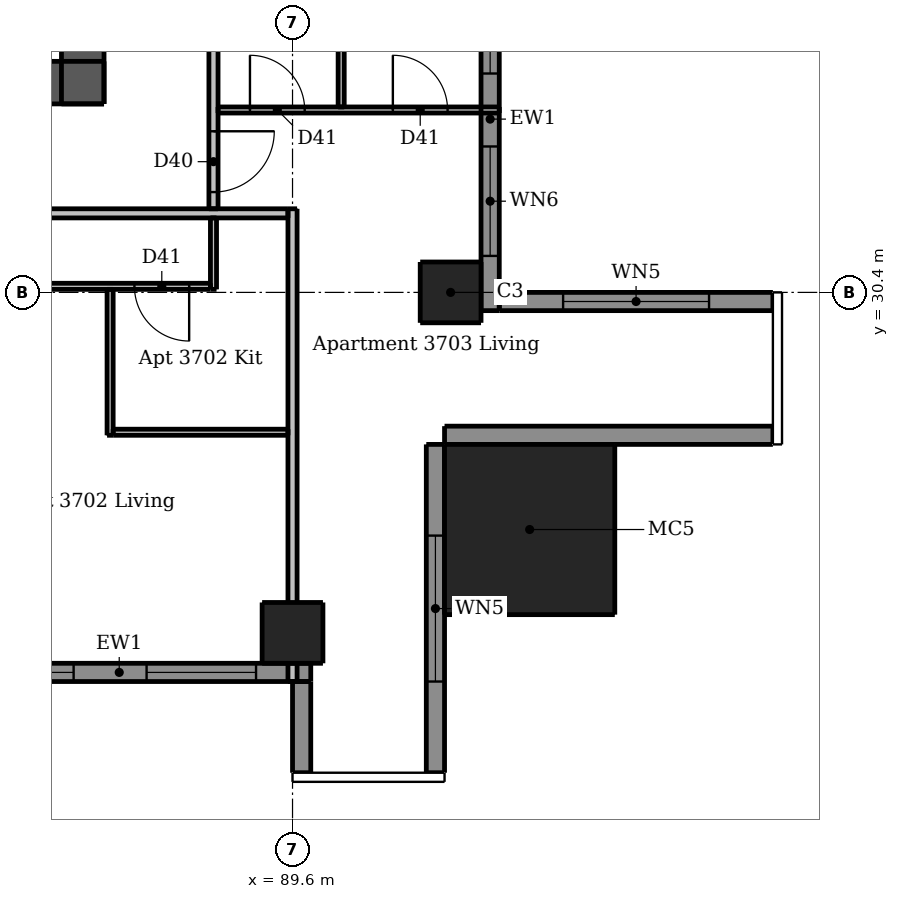
"""IFC4 building model, lengths in metres.
Left out: names, types, materials, properties, quantities, classifications, styles, units other than length and angle.
Written with IfcOpenShell. Run it as: python <this file> out.ifc"""

import sys

from ifc_helpers import new_model, si_unit, direction, frame, frame_2d, origin, origin_2d, place, context, subcontext, project, spatial, rectangle, extrude, element, fill, save


model = new_model("IFC4")
c1 = context("Model", 3, precision=1e-05, world=origin(), true_north=direction((0.0, 1.0)))
c2 = subcontext(c1, "Body", "Model", "MODEL_VIEW")
j1 = project(units=[si_unit("LENGTHUNIT", "METRE"), si_unit("PLANEANGLEUNIT", "RADIAN")], contexts=[c1])
p1 = place(None, origin())
s1 = spatial("IfcSite", under=j1, at=p1, CompositionType="ELEMENT")
p2 = place(p1, origin())
s2 = spatial("IfcBuilding", under=s1, at=p2, CompositionType="ELEMENT")
p3 = place(p2, frame((0.0, 0.0, 140.5)))
s3 = spatial("IfcBuildingStorey", under=s2, at=p3, CompositionType="ELEMENT", Elevation=140.5)
p4 = place(p3, frame((62.5, 33.85, 0.0), z_axis=(0.0, 0.0, 1.0), x_axis=(1.0, 0.0, 0.0)))
e1 = element("IfcWall", 1, at=p4, inside=s3, PredefinedType="SHEAR", context=c2, shape_type="SweptSolid", body=[
    extrude(rectangle(XDim=24.0, YDim=0.7, at=frame_2d((12.0, 0.0))), origin(), (0.0, 0.0, 1.0), 3.05),
])
p5 = place(p4, frame((1.962, 0.0, 0.0)))
e2 = element("IfcOpeningElement", 2, at=p5, cuts=e1, PredefinedType="OPENING", context=c2, shape_type="SweptSolid", body=[
    extrude(rectangle(XDim=1.1, YDim=2.1, at=frame_2d((0.55, 1.05))), frame((0.0, 0.36, 0.0), z_axis=(0.0, -1.0, 0.0), x_axis=(1.0, 0.0, 0.0)), (0.0, 0.0, 1.0), 0.72),
])
p6 = place(p4, frame((20.938, 0.0, 0.0)))
e3 = element("IfcOpeningElement", 3, at=p6, cuts=e1, PredefinedType="OPENING", context=c2, shape_type="SweptSolid", body=[
    extrude(rectangle(XDim=1.1, YDim=2.1, at=frame_2d((0.55, 1.05))), frame((0.0, 0.36, 0.0), z_axis=(0.0, -1.0, 0.0), x_axis=(1.0, 0.0, 0.0)), (0.0, 0.0, 1.0), 0.72),
])
p7 = place(p4, frame((8.0, 0.0, 0.0)))
e4 = element("IfcOpeningElement", 4, at=p7, cuts=e1, PredefinedType="OPENING", context=c2, shape_type="SweptSolid", body=[
    extrude(rectangle(XDim=1.1, YDim=2.1, at=frame_2d((0.55, 1.05))), frame((0.0, 0.36, 0.0), z_axis=(0.0, -1.0, 0.0), x_axis=(1.0, 0.0, 0.0)), (0.0, 0.0, 1.0), 0.72),
])
p8 = place(p4, frame((15.3, 0.0, 0.0)))
e5 = element("IfcOpeningElement", 5, at=p8, cuts=e1, PredefinedType="OPENING", context=c2, shape_type="SweptSolid", body=[
    extrude(rectangle(XDim=0.9, YDim=2.1, at=frame_2d((0.45, 1.05))), frame((0.0, 0.36, 0.0), z_axis=(0.0, -1.0, 0.0), x_axis=(1.0, 0.0, 0.0)), (0.0, 0.0, 1.0), 0.72),
])
p9 = place(p3, frame((86.15, 33.5, 0.0), z_axis=(0.0, 0.0, 1.0), x_axis=(0.0, 1.0, 0.0)))
e6 = element("IfcWall", 6, at=p9, inside=s3, PredefinedType="SHEAR", context=c2, shape_type="SweptSolid", body=[
    extrude(rectangle(XDim=24.0, YDim=0.7, at=frame_2d((12.0, 0.0))), origin(), (0.0, 0.0, 1.0), 3.05),
])
p10 = place(p9, frame((11.2, 0.0, 0.0)))
e7 = element("IfcOpeningElement", 7, at=p10, cuts=e6, PredefinedType="OPENING", context=c2, shape_type="SweptSolid", body=[
    extrude(rectangle(XDim=1.6, YDim=2.1, at=frame_2d((0.8, 1.05))), frame((0.0, 0.36, 0.0), z_axis=(0.0, -1.0, 0.0), x_axis=(1.0, 0.0, 0.0)), (0.0, 0.0, 1.0), 0.72),
])
for number, where, z_axis, x_axis in (
    (8, (89.6, 24.8, 0.0), (0.0, 0.0, 1.0), (1.0, 0.0, 0.0)),
    (9, (92.2, 30.4, 0.0), (0.0, 0.0, 1.0), (1.0, 0.0, 0.0)),
):
    element("IfcColumn", number, at=place(p3, frame(where, z_axis=z_axis, x_axis=x_axis)), inside=s3, PredefinedType="COLUMN", context=c2, shape_type="SweptSolid", body=[
        extrude(rectangle(XDim=1.0, YDim=1.0, at=origin_2d()), origin(), (0.0, 0.0, 1.0), 3.05),
    ])
p11 = place(p3, frame((93.5, 26.5, 0.0), z_axis=(0.0, 0.0, 1.0), x_axis=(1.0, 0.0, 0.0)))
e10 = element("IfcColumn", 10, at=p11, inside=s3, PredefinedType="COLUMN", context=c2, shape_type="SweptSolid", body=[
    extrude(rectangle(XDim=2.8, YDim=2.8, at=origin_2d()), origin(), (0.0, 0.0, 1.0), 3.3),
])
p12 = place(p3, frame((89.75, 24.0, 0.0), z_axis=(0.0, 0.0, 1.0), x_axis=(0.0, -1.0, 0.0)))
e11 = element("IfcWall", 11, at=p12, inside=s3, PredefinedType="SOLIDWALL", context=c2, shape_type="SweptSolid", body=[
    extrude(rectangle(XDim=1.5, YDim=0.3, at=frame_2d((0.75, 0.0))), origin(), (0.0, 0.0, 1.0), 3.05),
])
p13 = place(p3, frame((91.95, 22.5, 0.0), z_axis=(0.0, 0.0, 1.0), x_axis=(0.0, 1.0, 0.0)))
e12 = element("IfcWall", 12, at=p13, inside=s3, PredefinedType="SOLIDWALL", context=c2, shape_type="SweptSolid", body=[
    extrude(rectangle(XDim=5.4, YDim=0.3, at=frame_2d((2.7, 0.0))), origin(), (0.0, 0.0, 1.0), 3.05),
])
p14 = place(p13, frame((1.5, 0.0, 0.15)))
e13 = element("IfcOpeningElement", 13, at=p14, cuts=e12, PredefinedType="OPENING", context=c2, shape_type="SweptSolid", body=[
    extrude(rectangle(XDim=2.4, YDim=2.1, at=frame_2d((1.2, 1.05))), frame((0.0, 0.16, 0.0), z_axis=(0.0, -1.0, 0.0), x_axis=(1.0, 0.0, 0.0)), (0.0, 0.0, 1.0), 0.32),
])
p15 = place(p3, frame((92.1, 28.05, 0.0), z_axis=(0.0, 0.0, 1.0), x_axis=(1.0, 0.0, 0.0)))
e14 = element("IfcWall", 14, at=p15, inside=s3, PredefinedType="SOLIDWALL", context=c2, shape_type="SweptSolid", body=[
    extrude(rectangle(XDim=5.4, YDim=0.3, at=frame_2d((2.7, 0.0))), origin(), (0.0, 0.0, 1.0), 3.05),
])
p16 = place(p3, frame((97.5, 30.25, 0.0), z_axis=(0.0, 0.0, 1.0), x_axis=(-1.0, 0.0, 0.0)))
e15 = element("IfcWall", 15, at=p16, inside=s3, PredefinedType="SOLIDWALL", context=c2, shape_type="SweptSolid", body=[
    extrude(rectangle(XDim=4.5, YDim=0.3, at=frame_2d((2.25, 0.0))), origin(), (0.0, 0.0, 1.0), 3.05),
])
p17 = place(p16, frame((1.05, 0.0, 0.15)))
e16 = element("IfcOpeningElement", 16, at=p17, cuts=e15, PredefinedType="OPENING", context=c2, shape_type="SweptSolid", body=[
    extrude(rectangle(XDim=2.4, YDim=2.1, at=frame_2d((1.2, 1.05))), frame((0.0, 0.16, 0.0), z_axis=(0.0, -1.0, 0.0), x_axis=(1.0, 0.0, 0.0)), (0.0, 0.0, 1.0), 0.32),
])
p18 = place(p3, frame((83.6, 24.15, 0.0), z_axis=(0.0, 0.0, 1.0), x_axis=(1.0, 0.0, 0.0)))
e17 = element("IfcWall", 17, at=p18, inside=s3, PredefinedType="SOLIDWALL", context=c2, shape_type="SweptSolid", body=[
    extrude(rectangle(XDim=6.3, YDim=0.3, at=frame_2d((3.15, 0.0))), origin(), (0.0, 0.0, 1.0), 3.05),
])
p19 = place(p18, frame((0.6, 0.0, 0.15)))
e18 = element("IfcOpeningElement", 18, at=p19, cuts=e17, PredefinedType="OPENING", context=c2, shape_type="SweptSolid", body=[
    extrude(rectangle(XDim=1.8, YDim=2.1, at=frame_2d((0.9, 1.05))), frame((0.0, 0.16, 0.0), z_axis=(0.0, -1.0, 0.0), x_axis=(1.0, 0.0, 0.0)), (0.0, 0.0, 1.0), 0.32),
])
p20 = place(p18, frame((3.6, 0.0, 0.15)))
e19 = element("IfcOpeningElement", 19, at=p20, cuts=e17, PredefinedType="OPENING", context=c2, shape_type="SweptSolid", body=[
    extrude(rectangle(XDim=1.8, YDim=2.1, at=frame_2d((0.9, 1.05))), frame((0.0, 0.16, 0.0), z_axis=(0.0, -1.0, 0.0), x_axis=(1.0, 0.0, 0.0)), (0.0, 0.0, 1.0), 0.32),
])
p21 = place(p3, frame((92.85, 30.1, 0.0), z_axis=(0.0, 0.0, 1.0), x_axis=(0.0, 1.0, 0.0)))
e20 = element("IfcWall", 20, at=p21, inside=s3, PredefinedType="SOLIDWALL", context=c2, shape_type="SweptSolid", body=[
    extrude(rectangle(XDim=6.3, YDim=0.3, at=frame_2d((3.15, 0.0))), origin(), (0.0, 0.0, 1.0), 3.05),
])
p22 = place(p21, frame((0.9, 0.0, 0.15)))
e21 = element("IfcOpeningElement", 21, at=p22, cuts=e20, PredefinedType="OPENING", context=c2, shape_type="SweptSolid", body=[
    extrude(rectangle(XDim=1.8, YDim=2.1, at=frame_2d((0.9, 1.05))), frame((0.0, 0.16, 0.0), z_axis=(0.0, -1.0, 0.0), x_axis=(1.0, 0.0, 0.0)), (0.0, 0.0, 1.0), 0.32),
])
p23 = place(p21, frame((3.9, 0.0, 0.15)))
e22 = element("IfcOpeningElement", 22, at=p23, cuts=e20, PredefinedType="OPENING", context=c2, shape_type="SweptSolid", body=[
    extrude(rectangle(XDim=1.8, YDim=2.1, at=frame_2d((0.9, 1.05))), frame((0.0, 0.16, 0.0), z_axis=(0.0, -1.0, 0.0), x_axis=(1.0, 0.0, 0.0)), (0.0, 0.0, 1.0), 0.32),
])
p24 = place(p3, frame((86.6, 28.05, 0.0), z_axis=(0.0, 0.0, 1.0), x_axis=(0.0, 1.0, 0.0)))
e23 = element("IfcWall", 23, at=p24, inside=s3, PredefinedType="PARTITIONING", context=c2, shape_type="SweptSolid", body=[
    extrude(rectangle(XDim=2.4, YDim=0.1, at=frame_2d((1.2, 0.0))), origin(), (0.0, 0.0, 1.0), 3.05),
])
p25 = place(p3, frame((88.3, 30.45, 0.0), z_axis=(0.0, 0.0, 1.0), x_axis=(0.0, 1.0, 0.0)))
e24 = element("IfcWall", 24, at=p25, inside=s3, PredefinedType="PARTITIONING", context=c2, shape_type="SweptSolid", body=[
    extrude(rectangle(XDim=1.175, YDim=0.1, at=frame_2d((0.587, 0.0))), origin(), (0.0, 0.0, 1.0), 3.05),
])
p26 = place(p3, frame((90.4, 33.45, 0.0), z_axis=(0.0, 0.0, 1.0), x_axis=(0.0, 1.0, 0.0)))
e25 = element("IfcWall", 25, at=p26, inside=s3, PredefinedType="PARTITIONING", context=c2, shape_type="SweptSolid", body=[
    extrude(rectangle(XDim=5.975, YDim=0.1, at=frame_2d((2.988, 0.0))), origin(), (0.0, 0.0, 1.0), 3.05),
])
p27 = place(p26, frame((3.8, 0.0, 0.0)))
e26 = element("IfcOpeningElement", 26, at=p27, cuts=e25, PredefinedType="OPENING", context=c2, shape_type="SweptSolid", body=[
    extrude(rectangle(XDim=0.8, YDim=2.1, at=frame_2d((0.4, 1.05))), frame((0.0, 0.06, 0.0), z_axis=(0.0, -1.0, 0.0), x_axis=(1.0, 0.0, 0.0)), (0.0, 0.0, 1.0), 0.12),
])
p28 = place(p3, frame((88.375, 33.4, 0.0), z_axis=(0.0, 0.0, 1.0), x_axis=(1.0, 0.0, 0.0)))
e27 = element("IfcWall", 27, at=p28, inside=s3, PredefinedType="PARTITIONING", context=c2, shape_type="SweptSolid", body=[
    extrude(rectangle(XDim=4.625, YDim=0.1, at=frame_2d((2.312, 0.0))), origin(), (0.0, 0.0, 1.0), 3.05),
])
p29 = place(p28, frame((0.525, 0.0, 0.0)))
e28 = element("IfcOpeningElement", 28, at=p29, cuts=e27, PredefinedType="OPENING", context=c2, shape_type="SweptSolid", body=[
    extrude(rectangle(XDim=0.9, YDim=2.1, at=frame_2d((0.45, 1.05))), frame((0.0, 0.06, 0.0), z_axis=(0.0, -1.0, 0.0), x_axis=(1.0, 0.0, 0.0)), (0.0, 0.0, 1.0), 0.12),
])
p30 = place(p28, frame((2.875, 0.0, 0.0)))
e29 = element("IfcOpeningElement", 29, at=p30, cuts=e27, PredefinedType="OPENING", context=c2, shape_type="SweptSolid", body=[
    extrude(rectangle(XDim=0.9, YDim=2.1, at=frame_2d((0.45, 1.05))), frame((0.0, 0.06, 0.0), z_axis=(0.0, -1.0, 0.0), x_axis=(1.0, 0.0, 0.0)), (0.0, 0.0, 1.0), 0.12),
])
p31 = place(p3, frame((88.25, 30.5, 0.0), z_axis=(0.0, 0.0, 1.0), x_axis=(-1.0, 0.0, 0.0)))
e30 = element("IfcWall", 30, at=p31, inside=s3, PredefinedType="PARTITIONING", context=c2, shape_type="SweptSolid", body=[
    extrude(rectangle(XDim=16.575, YDim=0.1, at=frame_2d((8.288, 0.0))), origin(), (0.0, 0.0, 1.0), 3.05),
])
p32 = place(p31, frame((4.2, 0.0, 0.0)))
e31 = element("IfcOpeningElement", 31, at=p32, cuts=e30, PredefinedType="OPENING", context=c2, shape_type="SweptSolid", body=[
    extrude(rectangle(XDim=0.9, YDim=2.1, at=frame_2d((0.45, 1.05))), frame((0.0, 0.06, 0.0), z_axis=(0.0, -1.0, 0.0), x_axis=(1.0, 0.0, 0.0)), (0.0, 0.0, 1.0), 0.12),
])
p33 = place(p31, frame((0.35, 0.0, 0.0)))
e32 = element("IfcOpeningElement", 32, at=p33, cuts=e30, PredefinedType="OPENING", context=c2, shape_type="SweptSolid", body=[
    extrude(rectangle(XDim=0.9, YDim=2.1, at=frame_2d((0.45, 1.05))), frame((0.0, 0.06, 0.0), z_axis=(0.0, -1.0, 0.0), x_axis=(1.0, 0.0, 0.0)), (0.0, 0.0, 1.0), 0.12),
])
p34 = place(p31, frame((14.65, 0.0, 0.0)))
e33 = element("IfcOpeningElement", 33, at=p34, cuts=e30, PredefinedType="OPENING", context=c2, shape_type="SweptSolid", body=[
    extrude(rectangle(XDim=0.9, YDim=2.1, at=frame_2d((0.45, 1.05))), frame((0.0, 0.06, 0.0), z_axis=(0.0, -1.0, 0.0), x_axis=(1.0, 0.0, 0.0)), (0.0, 0.0, 1.0), 0.12),
])
p35 = place(p31, frame((11.35, 0.0, 0.0)))
e34 = element("IfcOpeningElement", 34, at=p35, cuts=e30, PredefinedType="OPENING", context=c2, shape_type="SweptSolid", body=[
    extrude(rectangle(XDim=0.9, YDim=2.1, at=frame_2d((0.45, 1.05))), frame((0.0, 0.06, 0.0), z_axis=(0.0, -1.0, 0.0), x_axis=(1.0, 0.0, 0.0)), (0.0, 0.0, 1.0), 0.12),
])
p36 = place(p31, frame((8.45, 0.0, 0.0)))
e35 = element("IfcOpeningElement", 35, at=p36, cuts=e30, PredefinedType="OPENING", context=c2, shape_type="SweptSolid", body=[
    extrude(rectangle(XDim=0.8, YDim=2.1, at=frame_2d((0.4, 1.05))), frame((0.0, 0.06, 0.0), z_axis=(0.0, -1.0, 0.0), x_axis=(1.0, 0.0, 0.0)), (0.0, 0.0, 1.0), 0.12),
])
p37 = place(p3, frame((86.65, 28.1, 0.0), z_axis=(0.0, 0.0, 1.0), x_axis=(1.0, 0.0, 0.0)))
e36 = element("IfcWall", 36, at=p37, inside=s3, PredefinedType="PARTITIONING", context=c2, shape_type="SweptSolid", body=[
    extrude(rectangle(XDim=2.875, YDim=0.1, at=frame_2d((1.438, 0.0))), origin(), (0.0, 0.0, 1.0), 3.05),
])
p38 = place(p3, frame((88.3, 60.475, 0.0), z_axis=(0.0, 0.0, 1.0), x_axis=(0.0, -1.0, 0.0)))
e37 = element("IfcWall", 37, at=p38, inside=s3, PredefinedType="PARTITIONING", context=c2, shape_type="SweptSolid", body=[
    extrude(rectangle(XDim=28.7, YDim=0.15, at=frame_2d((14.35, 0.0))), origin(), (0.0, 0.0, 1.0), 3.05),
])
p39 = place(p38, frame((27.425, 0.0, 0.0)))
e38 = element("IfcOpeningElement", 38, at=p39, cuts=e37, PredefinedType="OPENING", context=c2, shape_type="SweptSolid", body=[
    extrude(rectangle(XDim=1.0, YDim=2.1, at=frame_2d((0.5, 1.05))), frame((0.0, 0.085, 0.0), z_axis=(0.0, -1.0, 0.0), x_axis=(1.0, 0.0, 0.0)), (0.0, 0.0, 1.0), 0.17),
])
p40 = place(p38, frame((10.575, 0.0, 0.0)))
e39 = element("IfcOpeningElement", 39, at=p40, cuts=e37, PredefinedType="OPENING", context=c2, shape_type="SweptSolid", body=[
    extrude(rectangle(XDim=1.0, YDim=2.1, at=frame_2d((0.5, 1.05))), frame((0.0, 0.085, 0.0), z_axis=(0.0, -1.0, 0.0), x_axis=(1.0, 0.0, 0.0)), (0.0, 0.0, 1.0), 0.17),
])
p41 = place(p3, frame((89.6, 24.0, 0.0), z_axis=(0.0, 0.0, 1.0), x_axis=(0.0, 1.0, 0.0)))
e40 = element("IfcWall", 40, at=p41, inside=s3, PredefinedType="PARTITIONING", context=c2, shape_type="SweptSolid", body=[
    extrude(rectangle(XDim=7.775, YDim=0.15, at=frame_2d((3.887, 0.0))), origin(), (0.0, 0.0, 1.0), 2.51),
])
p42 = place(p3, frame((89.525, 31.7, 0.0), z_axis=(0.0, 0.0, 1.0), x_axis=(-1.0, 0.0, 0.0)))
e41 = element("IfcWall", 41, at=p42, inside=s3, PredefinedType="PARTITIONING", context=c2, shape_type="SweptSolid", body=[
    extrude(rectangle(XDim=28.75, YDim=0.15, at=frame_2d((14.375, 0.0))), origin(), (0.0, 0.0, 1.0), 3.05),
])
p43 = place(p42, frame((25.875, 0.0, 0.0)))
e42 = element("IfcOpeningElement", 42, at=p43, cuts=e41, PredefinedType="OPENING", context=c2, shape_type="SweptSolid", body=[
    extrude(rectangle(XDim=1.0, YDim=2.1, at=frame_2d((0.5, 1.05))), frame((0.0, 0.085, 0.0), z_axis=(0.0, -1.0, 0.0), x_axis=(1.0, 0.0, 0.0)), (0.0, 0.0, 1.0), 0.17),
])
p44 = place(p42, frame((9.075, 0.0, 0.0)))
e43 = element("IfcOpeningElement", 43, at=p44, cuts=e41, PredefinedType="OPENING", context=c2, shape_type="SweptSolid", body=[
    extrude(rectangle(XDim=1.0, YDim=2.1, at=frame_2d((0.5, 1.05))), frame((0.0, 0.085, 0.0), z_axis=(0.0, -1.0, 0.0), x_axis=(1.0, 0.0, 0.0)), (0.0, 0.0, 1.0), 0.17),
])
p45 = place(p14, origin())
e44 = element("IfcWindow", 44, at=p45, inside=s3, PartitioningType="DOUBLE_PANEL_VERTICAL", PredefinedType="WINDOW", context=c2, shape_type="SweptSolid", body=[
    extrude(rectangle(XDim=2.4, YDim=2.1, at=frame_2d((1.2, 1.05))), frame((0.0, 0.03, 0.0), z_axis=(0.0, -1.0, 0.0), x_axis=(1.0, 0.0, 0.0)), (0.0, 0.0, 1.0), 0.06),
])
fill(e13, e44)
p46 = place(p17, origin())
e45 = element("IfcWindow", 45, at=p46, inside=s3, PartitioningType="DOUBLE_PANEL_VERTICAL", PredefinedType="WINDOW", context=c2, shape_type="SweptSolid", body=[
    extrude(rectangle(XDim=2.4, YDim=2.1, at=frame_2d((1.2, 1.05))), frame((0.0, 0.03, 0.0), z_axis=(0.0, -1.0, 0.0), x_axis=(1.0, 0.0, 0.0)), (0.0, 0.0, 1.0), 0.06),
])
fill(e16, e45)
p47 = place(p19, origin())
e46 = element("IfcWindow", 46, at=p47, inside=s3, PartitioningType="DOUBLE_PANEL_VERTICAL", PredefinedType="WINDOW", context=c2, shape_type="SweptSolid", body=[
    extrude(rectangle(XDim=1.8, YDim=2.1, at=frame_2d((0.9, 1.05))), frame((0.0, 0.03, 0.0), z_axis=(0.0, -1.0, 0.0), x_axis=(1.0, 0.0, 0.0)), (0.0, 0.0, 1.0), 0.06),
])
fill(e18, e46)
p48 = place(p20, origin())
e47 = element("IfcWindow", 47, at=p48, inside=s3, PartitioningType="DOUBLE_PANEL_VERTICAL", PredefinedType="WINDOW", context=c2, shape_type="SweptSolid", body=[
    extrude(rectangle(XDim=1.8, YDim=2.1, at=frame_2d((0.9, 1.05))), frame((0.0, 0.03, 0.0), z_axis=(0.0, -1.0, 0.0), x_axis=(1.0, 0.0, 0.0)), (0.0, 0.0, 1.0), 0.06),
])
fill(e19, e47)
p49 = place(p22, origin())
e48 = element("IfcWindow", 48, at=p49, inside=s3, PartitioningType="DOUBLE_PANEL_VERTICAL", PredefinedType="WINDOW", context=c2, shape_type="SweptSolid", body=[
    extrude(rectangle(XDim=1.8, YDim=2.1, at=frame_2d((0.9, 1.05))), frame((0.0, 0.03, 0.0), z_axis=(0.0, -1.0, 0.0), x_axis=(1.0, 0.0, 0.0)), (0.0, 0.0, 1.0), 0.06),
])
fill(e21, e48)
p50 = place(p23, origin())
e49 = element("IfcWindow", 49, at=p50, inside=s3, PartitioningType="DOUBLE_PANEL_VERTICAL", PredefinedType="WINDOW", context=c2, shape_type="SweptSolid", body=[
    extrude(rectangle(XDim=1.8, YDim=2.1, at=frame_2d((0.9, 1.05))), frame((0.0, 0.03, 0.0), z_axis=(0.0, -1.0, 0.0), x_axis=(1.0, 0.0, 0.0)), (0.0, 0.0, 1.0), 0.06),
])
fill(e22, e49)
p51 = place(p33, origin())
e50 = element("IfcDoor", 50, at=p51, inside=s3, OperationType="SINGLE_SWING_LEFT", PredefinedType="DOOR", context=c2, shape_type="SweptSolid", body=[
    extrude(rectangle(XDim=0.9, YDim=2.1, at=frame_2d((0.45, 1.05))), frame((0.0, 0.025, 0.0), z_axis=(0.0, -1.0, 0.0), x_axis=(1.0, 0.0, 0.0)), (0.0, 0.0, 1.0), 0.05),
])
fill(e32, e50)
p52 = place(p39, origin())
e51 = element("IfcDoor", 51, at=p52, inside=s3, OperationType="SINGLE_SWING_LEFT", PredefinedType="DOOR", context=c2, shape_type="SweptSolid", body=[
    extrude(rectangle(XDim=1.0, YDim=2.1, at=frame_2d((0.5, 1.05))), frame((0.0, 0.025, 0.0), z_axis=(0.0, -1.0, 0.0), x_axis=(1.0, 0.0, 0.0)), (0.0, 0.0, 1.0), 0.05),
])
fill(e38, e51)
p53 = place(p29, origin())
e52 = element("IfcDoor", 52, at=p53, inside=s3, OperationType="SINGLE_SWING_LEFT", PredefinedType="DOOR", context=c2, shape_type="SweptSolid", body=[
    extrude(rectangle(XDim=0.9, YDim=2.1, at=frame_2d((0.45, 1.05))), frame((0.0, 0.025, 0.0), z_axis=(0.0, -1.0, 0.0), x_axis=(1.0, 0.0, 0.0)), (0.0, 0.0, 1.0), 0.05),
])
fill(e28, e52)
p54 = place(p30, origin())
e53 = element("IfcDoor", 53, at=p54, inside=s3, OperationType="SINGLE_SWING_LEFT", PredefinedType="DOOR", context=c2, shape_type="SweptSolid", body=[
    extrude(rectangle(XDim=0.9, YDim=2.1, at=frame_2d((0.45, 1.05))), frame((0.0, 0.025, 0.0), z_axis=(0.0, -1.0, 0.0), x_axis=(1.0, 0.0, 0.0)), (0.0, 0.0, 1.0), 0.05),
])
fill(e29, e53)
save(model, sys.argv[1])
